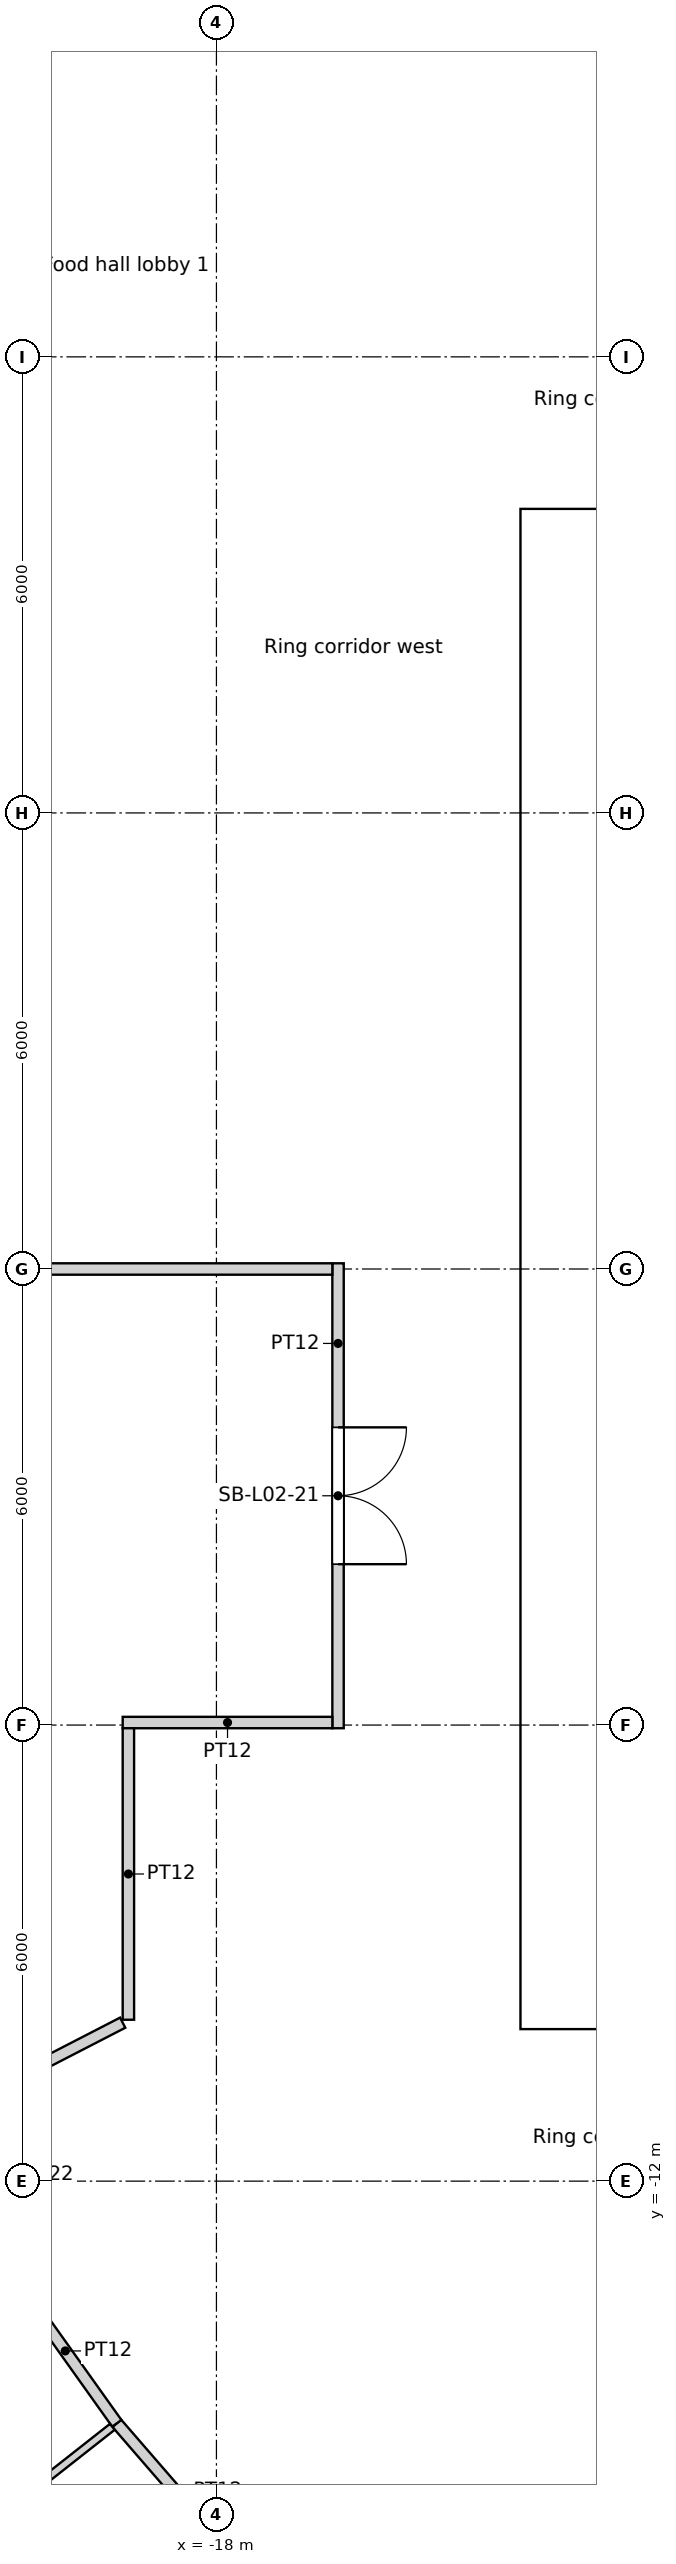
"""IFC4 building model, lengths in metres.
Left out: names, types, materials, properties, quantities, classifications, styles, units other than length and angle.
Written with IfcOpenShell. Run it as: python <this file> out.ifc"""

import sys

from ifc_helpers import new_model, si_unit, direction, frame, frame_2d, origin, origin_2d, place, context, subcontext, project, spatial, rectangle, circle, extrude, element, fill, save


model = new_model("IFC4")
c1 = context("Model", 3, precision=1e-05, world=origin(), true_north=direction((0.0, 1.0)))
c2 = subcontext(c1, "Body", "Model", "MODEL_VIEW")
j1 = project(units=[si_unit("LENGTHUNIT", "METRE"), si_unit("PLANEANGLEUNIT", "RADIAN")], contexts=[c1])
p1 = place(None, origin())
s1 = spatial("IfcSite", under=j1, at=p1, CompositionType="ELEMENT")
p2 = place(p1, origin())
s2 = spatial("IfcBuilding", under=s1, at=p2, CompositionType="ELEMENT")
p3 = place(p2, frame((0.0, 0.0, 13.8)))
s3 = spatial("IfcBuildingStorey", under=s2, at=p3, CompositionType="ELEMENT", Elevation=13.8)
for number, where, z_axis, x_axis in (
    (1, (-20.509, 13.489, 0.0), (0.0, 0.0, 1.0), (1.0, 0.0, 0.0)),
    (2, (-20.509, -13.489, 0.0), (0.0, 0.0, 1.0), (1.0, 0.0, 0.0)),
):
    element("IfcColumn", number, at=place(p3, frame(where, z_axis=z_axis, x_axis=x_axis)), inside=s3, PredefinedType="COLUMN", context=c2, shape_type="SweptSolid", body=[
        extrude(circle(Radius=0.75, at=origin_2d()), origin(), (0.0, 0.0, 1.0), 4.8),
    ])
for number, where, z_axis, x_axis in (
    (3, (-13.798, 12.802, 0.0), (0.0, 0.0, 1.0), (1.0, 0.0, 0.0)),
    (4, (-16.958, 8.167, 0.0), (0.0, 0.0, 1.0), (1.0, 0.0, 0.0)),
    (5, (-18.612, 2.805, 0.0), (0.0, 0.0, 1.0), (1.0, 0.0, 0.0)),
    (6, (-18.612, -2.805, 0.0), (0.0, 0.0, 1.0), (1.0, 0.0, 0.0)),
    (7, (-16.958, -8.167, 0.0), (0.0, 0.0, 1.0), (1.0, 0.0, 0.0)),
    (8, (-13.798, -12.802, 0.0), (0.0, 0.0, 1.0), (1.0, 0.0, 0.0)),
):
    element("IfcColumn", number, at=place(p3, frame(where, z_axis=z_axis, x_axis=x_axis)), inside=s3, PredefinedType="COLUMN", context=c2, shape_type="SweptSolid", body=[
        extrude(circle(Radius=0.8, at=origin_2d()), origin(), (0.0, 0.0, 1.0), 4.8),
    ])
p4 = place(p3, frame((-14.0, -9.4, 0.0), z_axis=(0.0, 0.0, 1.0), x_axis=(1.0, 0.0, 0.0)))
e9 = element("IfcWall", 9, at=p4, inside=s3, PredefinedType="SOLIDWALL", context=c2, shape_type="SweptSolid", body=[
    extrude(rectangle(XDim=28.0, YDim=1.2, at=frame_2d((14.0, 0.0))), origin(), (0.0, 0.0, 1.0), 4.8),
])
p5 = place(p4, frame((14.9, 0.0, 0.0)))
e10 = element("IfcOpeningElement", 10, at=p5, cuts=e9, PredefinedType="OPENING", context=c2, shape_type="SweptSolid", body=[
    extrude(rectangle(XDim=1.0, YDim=2.1, at=frame_2d((0.5, 1.05))), frame((0.0, 0.6, 0.0), z_axis=(0.0, -1.0, 0.0), x_axis=(1.0, 0.0, 0.0)), (0.0, 0.0, 1.0), 1.2),
])
p6 = place(p4, frame((9.8, 0.0, 0.0)))
e11 = element("IfcOpeningElement", 11, at=p6, cuts=e9, PredefinedType="OPENING", context=c2, shape_type="SweptSolid", body=[
    extrude(rectangle(XDim=1.8, YDim=2.1, at=frame_2d((0.9, 1.05))), frame((0.0, 0.6, 0.0), z_axis=(0.0, -1.0, 0.0), x_axis=(1.0, 0.0, 0.0)), (0.0, 0.0, 1.0), 1.2),
])
p7 = place(p4, frame((16.4, 0.0, 0.0)))
e12 = element("IfcOpeningElement", 12, at=p7, cuts=e9, PredefinedType="OPENING", context=c2, shape_type="SweptSolid", body=[
    extrude(rectangle(XDim=1.8, YDim=2.1, at=frame_2d((0.9, 1.05))), frame((0.0, 0.6, 0.0), z_axis=(0.0, -1.0, 0.0), x_axis=(1.0, 0.0, 0.0)), (0.0, 0.0, 1.0), 1.2),
])
p8 = place(p3, frame((-14.0, 9.4, 0.0), z_axis=(0.0, 0.0, 1.0), x_axis=(1.0, 0.0, 0.0)))
e13 = element("IfcWall", 13, at=p8, inside=s3, PredefinedType="SOLIDWALL", context=c2, shape_type="SweptSolid", body=[
    extrude(rectangle(XDim=28.0, YDim=1.2, at=frame_2d((14.0, 0.0))), origin(), (0.0, 0.0, 1.0), 4.8),
])
p9 = place(p8, frame((9.8, 0.0, 0.0)))
e14 = element("IfcOpeningElement", 14, at=p9, cuts=e13, PredefinedType="OPENING", context=c2, shape_type="SweptSolid", body=[
    extrude(rectangle(XDim=1.8, YDim=2.1, at=frame_2d((0.9, 1.05))), frame((0.0, 0.6, 0.0), z_axis=(0.0, -1.0, 0.0), x_axis=(1.0, 0.0, 0.0)), (0.0, 0.0, 1.0), 1.2),
])
p10 = place(p3, frame((-13.4, -8.8, 0.0), z_axis=(0.0, 0.0, 1.0), x_axis=(0.0, 1.0, 0.0)))
e15 = element("IfcWall", 15, at=p10, inside=s3, PredefinedType="SOLIDWALL", context=c2, shape_type="SweptSolid", body=[
    extrude(rectangle(XDim=17.6, YDim=1.2, at=frame_2d((8.8, 0.0))), origin(), (0.0, 0.0, 1.0), 4.8),
])
p11 = place(p10, frame((5.2, 0.0, 0.0)))
e16 = element("IfcOpeningElement", 16, at=p11, cuts=e15, PredefinedType="OPENING", context=c2, shape_type="SweptSolid", body=[
    extrude(rectangle(XDim=1.0, YDim=2.1, at=frame_2d((0.5, 1.05))), frame((0.0, 0.6, 0.0), z_axis=(0.0, -1.0, 0.0), x_axis=(1.0, 0.0, 0.0)), (0.0, 0.0, 1.0), 1.2),
])
p12 = place(p10, frame((11.4, 0.0, 0.0)))
e17 = element("IfcOpeningElement", 17, at=p12, cuts=e15, PredefinedType="OPENING", context=c2, shape_type="SweptSolid", body=[
    extrude(rectangle(XDim=1.0, YDim=2.1, at=frame_2d((0.5, 1.05))), frame((0.0, 0.6, 0.0), z_axis=(0.0, -1.0, 0.0), x_axis=(1.0, 0.0, 0.0)), (0.0, 0.0, 1.0), 1.2),
])
p13 = place(p3, frame((-26.619, 0.0, 0.0), z_axis=(0.0, 0.0, 1.0), x_axis=(1.0, 0.0, 0.0)))
e18 = element("IfcWall", 18, at=p13, inside=s3, PredefinedType="PARTITIONING", context=c2, shape_type="SweptSolid", body=[
    extrude(rectangle(XDim=10.144, YDim=0.15, at=frame_2d((5.072, 0.0))), origin(), (0.0, 0.0, 1.0), 3.75),
])
p14 = place(p3, frame((-24.544, -19.302, 0.0), z_axis=(0.0, 0.0, 1.0), x_axis=(0.786055722677, 0.618155644515, 0.0)))
e19 = element("IfcWall", 19, at=p14, inside=s3, PredefinedType="PARTITIONING", context=c2, shape_type="SweptSolid", body=[
    extrude(rectangle(XDim=6.583, YDim=0.1, at=frame_2d((3.291, 0.0))), origin(), (0.0, 0.0, 1.0), 3.75),
])
p15 = place(p3, frame((-21.836, -11.257, 0.0), z_axis=(0.0, 0.0, 1.0), x_axis=(0.888822270684, 0.458252082522, 0.0)))
e20 = element("IfcWall", 20, at=p15, inside=s3, PredefinedType="PARTITIONING", context=c2, shape_type="SweptSolid", body=[
    extrude(rectangle(XDim=2.928, YDim=0.15, at=frame_2d((1.464, 0.0))), origin(), (0.0, 0.0, 1.0), 3.75),
])
p16 = place(p3, frame((-20.667, -13.282, 0.0), z_axis=(0.0, 0.0, 1.0), x_axis=(0.580032319147, -0.814593462252, 0.0)))
e21 = element("IfcWall", 21, at=p16, inside=s3, PredefinedType="PARTITIONING", context=c2, shape_type="SweptSolid", body=[
    extrude(rectangle(XDim=2.338, YDim=0.15, at=frame_2d((1.169, 0.0))), origin(), (0.0, 0.0, 1.0), 3.75),
])
p17 = place(p3, frame((-19.311, -15.186, 0.0), z_axis=(0.0, 0.0, 1.0), x_axis=(0.654866925236, -0.755744209526, 0.0)))
e22 = element("IfcWall", 22, at=p17, inside=s3, PredefinedType="PARTITIONING", context=c2, shape_type="SweptSolid", body=[
    extrude(rectangle(XDim=2.338, YDim=0.15, at=frame_2d((1.169, 0.0))), origin(), (0.0, 0.0, 1.0), 3.75),
])
p18 = place(p3, frame((-19.158, -6.042, 0.0), z_axis=(0.0, 0.0, 1.0), x_axis=(0.0, -1.0, 0.0)))
e23 = element("IfcWall", 23, at=p18, inside=s3, PredefinedType="PARTITIONING", context=c2, shape_type="SweptSolid", body=[
    extrude(rectangle(XDim=3.835, YDim=0.15, at=frame_2d((1.917, 0.0))), origin(), (0.0, 0.0, 1.0), 3.75),
])
p19 = place(p3, frame((-16.475, -5.967, 0.0), z_axis=(0.0, 0.0, 1.0), x_axis=(-1.0, 0.0, 0.0)))
e24 = element("IfcWall", 24, at=p19, inside=s3, PredefinedType="PARTITIONING", context=c2, shape_type="SweptSolid", body=[
    extrude(rectangle(XDim=2.758, YDim=0.15, at=frame_2d((1.379, 0.0))), origin(), (0.0, 0.0, 1.0), 3.75),
])
p20 = place(p3, frame((-16.4, -6.042, 0.0), z_axis=(0.0, 0.0, 1.0), x_axis=(0.0, 1.0, 0.0)))
e25 = element("IfcWall", 25, at=p20, inside=s3, PredefinedType="PARTITIONING", context=c2, shape_type="SweptSolid", body=[
    extrude(rectangle(XDim=6.117, YDim=0.15, at=frame_2d((3.058, 0.0))), origin(), (0.0, 0.0, 1.0), 3.75),
])
p21 = place(p20, frame((2.158, 0.0, 0.0)))
e26 = element("IfcOpeningElement", 26, at=p21, cuts=e25, PredefinedType="OPENING", context=c2, shape_type="SweptSolid", body=[
    extrude(rectangle(XDim=1.8, YDim=2.4, at=frame_2d((0.9, 1.2))), frame((0.0, 0.075, 0.0), z_axis=(0.0, -1.0, 0.0), x_axis=(1.0, 0.0, 0.0)), (0.0, 0.0, 1.0), 0.15),
])
p22 = place(p3, frame((-15.612, 27.041, 0.0), z_axis=(0.0, 0.0, 1.0), x_axis=(0.49999534853, -0.866028089296, 0.0)))
e27 = element("IfcWall", 27, at=p22, inside=s3, PredefinedType="PARTITIONING", context=c2, shape_type="SweptSolid", body=[
    extrude(rectangle(XDim=16.805, YDim=0.175, at=frame_2d((8.402, 0.0))), origin(), (0.0, 0.0, 1.0), 3.75),
])
p23 = place(p11, origin())
e28 = element("IfcDoor", 28, at=p23, inside=s3, OperationType="DOUBLE_DOOR_SINGLE_SWING", PredefinedType="DOOR", context=c2, shape_type="SweptSolid", body=[
    extrude(rectangle(XDim=1.0, YDim=2.1, at=frame_2d((0.5, 1.05))), frame((0.0, 0.025, 0.0), z_axis=(0.0, -1.0, 0.0), x_axis=(1.0, 0.0, 0.0)), (0.0, 0.0, 1.0), 0.05),
])
fill(e16, e28)
p24 = place(p12, origin())
e29 = element("IfcDoor", 29, at=p24, inside=s3, OperationType="DOUBLE_DOOR_SINGLE_SWING", PredefinedType="DOOR", context=c2, shape_type="SweptSolid", body=[
    extrude(rectangle(XDim=1.0, YDim=2.1, at=frame_2d((0.5, 1.05))), frame((0.0, 0.025, 0.0), z_axis=(0.0, -1.0, 0.0), x_axis=(1.0, 0.0, 0.0)), (0.0, 0.0, 1.0), 0.05),
])
fill(e17, e29)
p25 = place(p21, origin())
e30 = element("IfcDoor", 30, at=p25, inside=s3, OperationType="DOUBLE_DOOR_SINGLE_SWING", PredefinedType="DOOR", context=c2, shape_type="SweptSolid", body=[
    extrude(rectangle(XDim=1.8, YDim=2.4, at=frame_2d((0.9, 1.2))), frame((0.0, 0.025, 0.0), z_axis=(0.0, -1.0, 0.0), x_axis=(1.0, 0.0, 0.0)), (0.0, 0.0, 1.0), 0.05),
])
fill(e26, e30)
save(model, sys.argv[1])
